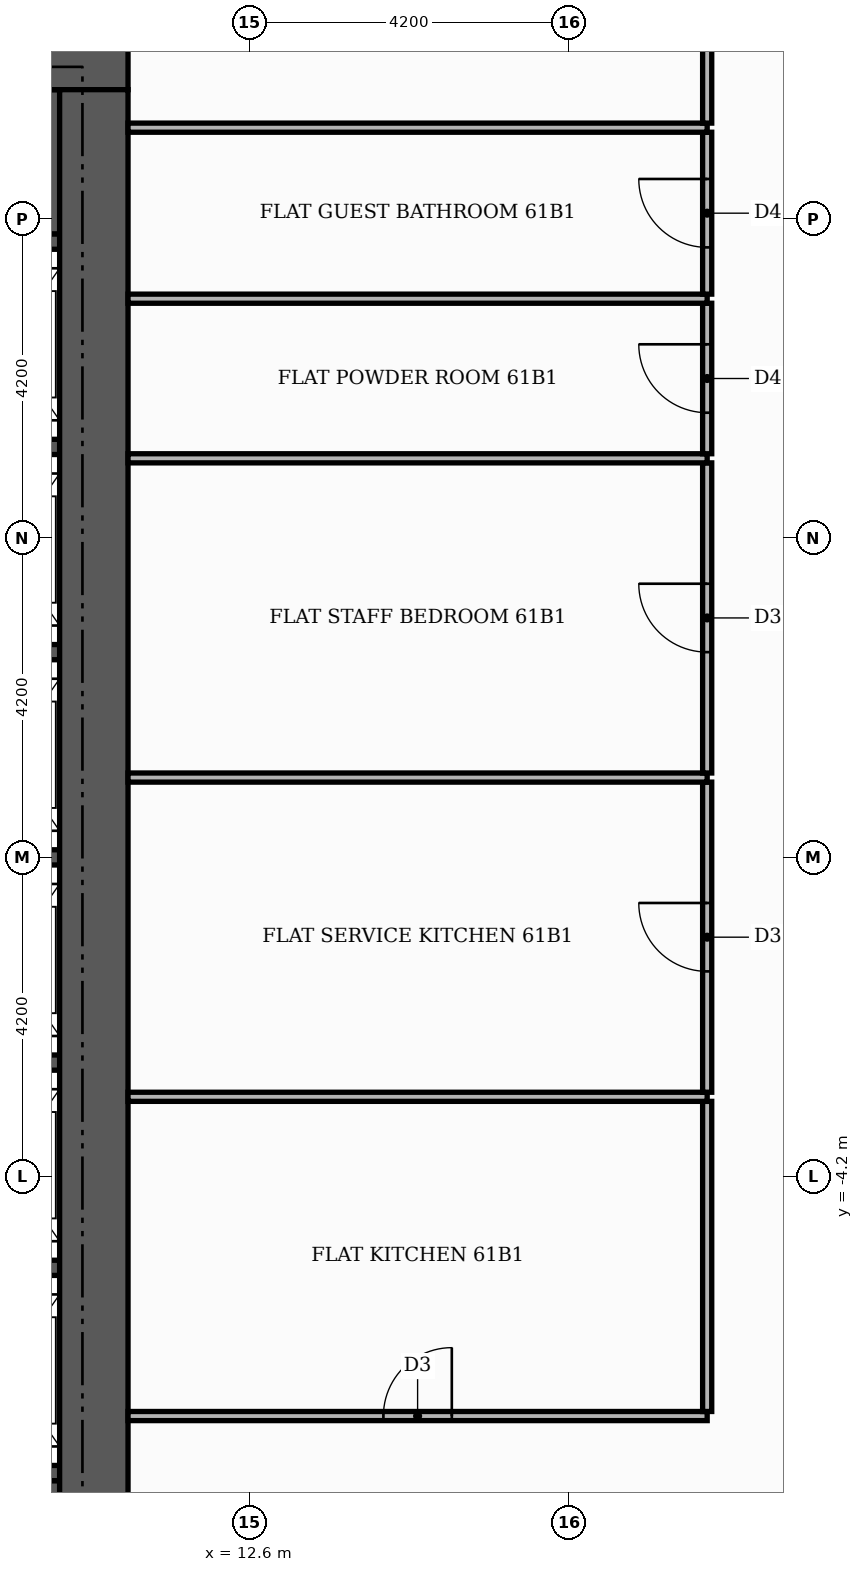
"""IFC4 building model, lengths in metres.
Left out: names, types, materials, properties, quantities, classifications, styles, units other than length and angle.
Written with IfcOpenShell. Run it as: python <this file> out.ifc"""

import sys

from ifc_helpers import new_model, si_unit, direction, frame, frame_2d, origin, place, context, subcontext, project, spatial, rectangle, extrude, element, fill, save


model = new_model("IFC4")
c1 = context("Model", 3, precision=1e-05, world=origin(), true_north=direction((0.0, 1.0)))
c2 = subcontext(c1, "Body", "Model", "MODEL_VIEW")
j1 = project(units=[si_unit("LENGTHUNIT", "METRE"), si_unit("PLANEANGLEUNIT", "RADIAN")], contexts=[c1])
p1 = place(None, origin())
s1 = spatial("IfcSite", under=j1, at=p1, CompositionType="ELEMENT")
p2 = place(p1, origin())
s2 = spatial("IfcBuilding", under=s1, at=p2, CompositionType="ELEMENT")
p3 = place(p2, frame((0.0, 0.0, 256.2)))
s3 = spatial("IfcBuildingStorey", under=s2, at=p3, CompositionType="ELEMENT", Elevation=256.2)
for number, where, z_axis, x_axis in (
    (1, (5.5, -9.15, 0.0), (0.0, 0.0, 1.0), (1.0, 0.0, 0.0)),
    (2, (5.5, 9.15, 0.0), (0.0, 0.0, 1.0), (1.0, 0.0, 0.0)),
):
    element("IfcWall", number, at=place(p3, frame(where, z_axis=z_axis, x_axis=x_axis)), inside=s3, PredefinedType="SHEAR", context=c2, shape_type="SweptSolid", body=[
        extrude(rectangle(XDim=4.6, YDim=1.9, at=frame_2d((2.3, 0.0))), origin(), (0.0, 0.0, 1.0), 3.48),
    ])
for number, where, z_axis, x_axis in (
    (3, (8.1, -8.1, 0.0), (0.0, 0.0, 1.0), (1.0, 0.0, 0.0)),
    (4, (8.1, -5.4, 0.0), (0.0, 0.0, 1.0), (1.0, 0.0, 0.0)),
    (5, (8.1, -2.7, 0.0), (0.0, 0.0, 1.0), (1.0, 0.0, 0.0)),
    (6, (8.1, 0.0, 0.0), (0.0, 0.0, 1.0), (1.0, 0.0, 0.0)),
    (7, (8.1, 2.7, 0.0), (0.0, 0.0, 1.0), (1.0, 0.0, 0.0)),
    (8, (8.1, 5.4, 0.0), (0.0, 0.0, 1.0), (1.0, 0.0, 0.0)),
    (9, (8.1, 8.1, 0.0), (0.0, 0.0, 1.0), (1.0, 0.0, 0.0)),
):
    element("IfcWall", number, at=place(p3, frame(where, z_axis=z_axis, x_axis=x_axis)), inside=s3, PredefinedType="SHEAR", context=c2, shape_type="SweptSolid", body=[
        extrude(rectangle(XDim=2.0, YDim=0.2, at=frame_2d((1.0, 0.0))), origin(), (0.0, 0.0, 1.0), 3.48),
    ])
p4 = place(p3, frame((-11.0, 10.55, 0.0), z_axis=(0.0, 0.0, 1.0), x_axis=(1.0, 0.0, 0.0)))
e10 = element("IfcWall", 10, at=p4, inside=s3, PredefinedType="SHEAR", context=c2, shape_type="SweptSolid", body=[
    extrude(rectangle(XDim=22.0, YDim=0.9, at=frame_2d((11.0, 0.0))), origin(), (0.0, 0.0, 1.0), 3.48),
])
p5 = place(p4, frame((13.3, 0.0, 0.0)))
e11 = element("IfcOpeningElement", 11, at=p5, cuts=e10, PredefinedType="OPENING", context=c2, shape_type="SweptSolid", body=[
    extrude(rectangle(XDim=1.8, YDim=2.2, at=frame_2d((0.9, 1.1))), frame((0.0, 0.46, 0.0), z_axis=(0.0, -1.0, 0.0), x_axis=(1.0, 0.0, 0.0)), (0.0, 0.0, 1.0), 0.92),
])
p6 = place(p3, frame((10.55, -10.1, 0.0), z_axis=(0.0, 0.0, 1.0), x_axis=(0.0, 1.0, 0.0)))
e12 = element("IfcWall", 12, at=p6, inside=s3, PredefinedType="SHEAR", context=c2, shape_type="SweptSolid", body=[
    extrude(rectangle(XDim=20.2, YDim=0.9, at=frame_2d((10.1, 0.0))), origin(), (0.0, 0.0, 1.0), 3.48),
])
p7 = place(p3, frame((11.0, -7.35, 0.0), z_axis=(0.0, 0.0, 1.0), x_axis=(1.0, 0.0, 0.0)))
e13 = element("IfcWall", 13, at=p7, inside=s3, PredefinedType="PARTITIONING", context=c2, shape_type="SweptSolid", body=[
    extrude(rectangle(XDim=7.62, YDim=0.12, at=frame_2d((3.81, 0.0))), origin(), (0.0, 0.0, 1.0), 3.48),
])
p8 = place(p7, frame((3.36, 0.0, 0.0)))
e14 = element("IfcOpeningElement", 14, at=p8, cuts=e13, PredefinedType="OPENING", context=c2, shape_type="SweptSolid", body=[
    extrude(rectangle(XDim=0.9, YDim=2.1, at=frame_2d((0.45, 1.05))), frame((0.0, 0.07, 0.0), z_axis=(0.0, -1.0, 0.0), x_axis=(1.0, 0.0, 0.0)), (0.0, 0.0, 1.0), 0.14),
])
p9 = place(p3, frame((18.62, -7.29, 0.0), z_axis=(0.0, 0.0, 1.0), x_axis=(0.0, 1.0, 0.0)))
e15 = element("IfcWall", 15, at=p9, inside=s3, PredefinedType="PARTITIONING", context=c2, shape_type="SweptSolid", body=[
    extrude(rectangle(XDim=4.08, YDim=0.12, at=frame_2d((2.04, 0.0))), origin(), (0.0, 0.0, 1.0), 3.48),
])
p10 = place(p3, frame((11.0, -3.15, 0.0), z_axis=(0.0, 0.0, 1.0), x_axis=(1.0, 0.0, 0.0)))
e16 = element("IfcWall", 16, at=p10, inside=s3, PredefinedType="PARTITIONING", context=c2, shape_type="SweptSolid", body=[
    extrude(rectangle(XDim=7.62, YDim=0.12, at=frame_2d((3.81, 0.0))), origin(), (0.0, 0.0, 1.0), 3.48),
])
p11 = place(p3, frame((18.62, -3.09, 0.0), z_axis=(0.0, 0.0, 1.0), x_axis=(0.0, 1.0, 0.0)))
e17 = element("IfcWall", 17, at=p11, inside=s3, PredefinedType="PARTITIONING", context=c2, shape_type="SweptSolid", body=[
    extrude(rectangle(XDim=4.08, YDim=0.12, at=frame_2d((2.04, 0.0))), origin(), (0.0, 0.0, 1.0), 3.48),
])
p12 = place(p11, frame((1.59, 0.0, 0.0)))
e18 = element("IfcOpeningElement", 18, at=p12, cuts=e17, PredefinedType="OPENING", context=c2, shape_type="SweptSolid", body=[
    extrude(rectangle(XDim=0.9, YDim=2.1, at=frame_2d((0.45, 1.05))), frame((0.0, 0.07, 0.0), z_axis=(0.0, -1.0, 0.0), x_axis=(1.0, 0.0, 0.0)), (0.0, 0.0, 1.0), 0.14),
])
p13 = place(p3, frame((11.0, 1.05, 0.0), z_axis=(0.0, 0.0, 1.0), x_axis=(1.0, 0.0, 0.0)))
e19 = element("IfcWall", 19, at=p13, inside=s3, PredefinedType="PARTITIONING", context=c2, shape_type="SweptSolid", body=[
    extrude(rectangle(XDim=7.62, YDim=0.12, at=frame_2d((3.81, 0.0))), origin(), (0.0, 0.0, 1.0), 3.48),
])
p14 = place(p3, frame((18.62, 1.11, 0.0), z_axis=(0.0, 0.0, 1.0), x_axis=(0.0, 1.0, 0.0)))
e20 = element("IfcWall", 20, at=p14, inside=s3, PredefinedType="PARTITIONING", context=c2, shape_type="SweptSolid", body=[
    extrude(rectangle(XDim=4.08, YDim=0.12, at=frame_2d((2.04, 0.0))), origin(), (0.0, 0.0, 1.0), 3.48),
])
p15 = place(p14, frame((1.59, 0.0, 0.0)))
e21 = element("IfcOpeningElement", 21, at=p15, cuts=e20, PredefinedType="OPENING", context=c2, shape_type="SweptSolid", body=[
    extrude(rectangle(XDim=0.9, YDim=2.1, at=frame_2d((0.45, 1.05))), frame((0.0, 0.07, 0.0), z_axis=(0.0, -1.0, 0.0), x_axis=(1.0, 0.0, 0.0)), (0.0, 0.0, 1.0), 0.14),
])
p16 = place(p3, frame((11.0, 5.25, 0.0), z_axis=(0.0, 0.0, 1.0), x_axis=(1.0, 0.0, 0.0)))
e22 = element("IfcWall", 22, at=p16, inside=s3, PredefinedType="PARTITIONING", context=c2, shape_type="SweptSolid", body=[
    extrude(rectangle(XDim=7.62, YDim=0.12, at=frame_2d((3.81, 0.0))), origin(), (0.0, 0.0, 1.0), 3.48),
])
p17 = place(p3, frame((18.62, 5.31, 0.0), z_axis=(0.0, 0.0, 1.0), x_axis=(0.0, 1.0, 0.0)))
e23 = element("IfcWall", 23, at=p17, inside=s3, PredefinedType="PARTITIONING", context=c2, shape_type="SweptSolid", body=[
    extrude(rectangle(XDim=1.98, YDim=0.12, at=frame_2d((0.99, 0.0))), origin(), (0.0, 0.0, 1.0), 3.48),
])
p18 = place(p17, frame((0.54, 0.0, 0.0)))
e24 = element("IfcOpeningElement", 24, at=p18, cuts=e23, PredefinedType="OPENING", context=c2, shape_type="SweptSolid", body=[
    extrude(rectangle(XDim=0.9, YDim=2.1, at=frame_2d((0.45, 1.05))), frame((0.0, 0.07, 0.0), z_axis=(0.0, -1.0, 0.0), x_axis=(1.0, 0.0, 0.0)), (0.0, 0.0, 1.0), 0.14),
])
p19 = place(p3, frame((11.0, 7.35, 0.0), z_axis=(0.0, 0.0, 1.0), x_axis=(1.0, 0.0, 0.0)))
e25 = element("IfcWall", 25, at=p19, inside=s3, PredefinedType="PARTITIONING", context=c2, shape_type="SweptSolid", body=[
    extrude(rectangle(XDim=7.62, YDim=0.12, at=frame_2d((3.81, 0.0))), origin(), (0.0, 0.0, 1.0), 3.48),
])
p20 = place(p3, frame((18.62, 7.41, 0.0), z_axis=(0.0, 0.0, 1.0), x_axis=(0.0, 1.0, 0.0)))
e26 = element("IfcWall", 26, at=p20, inside=s3, PredefinedType="PARTITIONING", context=c2, shape_type="SweptSolid", body=[
    extrude(rectangle(XDim=2.13, YDim=0.12, at=frame_2d((1.065, 0.0))), origin(), (0.0, 0.0, 1.0), 3.48),
])
p21 = place(p20, frame((0.615, 0.0, 0.0)))
e27 = element("IfcOpeningElement", 27, at=p21, cuts=e26, PredefinedType="OPENING", context=c2, shape_type="SweptSolid", body=[
    extrude(rectangle(XDim=0.9, YDim=2.1, at=frame_2d((0.45, 1.05))), frame((0.0, 0.07, 0.0), z_axis=(0.0, -1.0, 0.0), x_axis=(1.0, 0.0, 0.0)), (0.0, 0.0, 1.0), 0.14),
])
p22 = place(p3, frame((11.0, 9.6, 0.0), z_axis=(0.0, 0.0, 1.0), x_axis=(1.0, 0.0, 0.0)))
e28 = element("IfcWall", 28, at=p22, inside=s3, PredefinedType="PARTITIONING", context=c2, shape_type="SweptSolid", body=[
    extrude(rectangle(XDim=7.62, YDim=0.12, at=frame_2d((3.81, 0.0))), origin(), (0.0, 0.0, 1.0), 3.48),
])
p23 = place(p3, frame((18.62, 9.66, 0.0), z_axis=(0.0, 0.0, 1.0), x_axis=(0.0, 1.0, 0.0)))
e29 = element("IfcWall", 29, at=p23, inside=s3, PredefinedType="PARTITIONING", context=c2, shape_type="SweptSolid", body=[
    extrude(rectangle(XDim=3.89, YDim=0.12, at=frame_2d((1.945, 0.0))), origin(), (0.0, 0.0, 1.0), 3.48),
])
p24 = place(p23, frame((1.515, 0.0, 0.0)))
e30 = element("IfcOpeningElement", 30, at=p24, cuts=e29, PredefinedType="OPENING", context=c2, shape_type="SweptSolid", body=[
    extrude(rectangle(XDim=0.9, YDim=2.1, at=frame_2d((0.45, 1.05))), frame((0.0, 0.07, 0.0), z_axis=(0.0, -1.0, 0.0), x_axis=(1.0, 0.0, 0.0)), (0.0, 0.0, 1.0), 0.14),
])
p25 = place(p8, origin())
e31 = element("IfcDoor", 31, at=p25, inside=s3, OperationType="SINGLE_SWING_RIGHT", PredefinedType="DOOR", context=c2, shape_type="SweptSolid", body=[
    extrude(rectangle(XDim=0.9, YDim=2.1, at=frame_2d((0.45, 1.05))), frame((0.0, 0.025, 0.0), z_axis=(0.0, -1.0, 0.0), x_axis=(1.0, 0.0, 0.0)), (0.0, 0.0, 1.0), 0.05),
])
fill(e14, e31)
p26 = place(p12, origin())
e32 = element("IfcDoor", 32, at=p26, inside=s3, OperationType="SINGLE_SWING_RIGHT", PredefinedType="DOOR", context=c2, shape_type="SweptSolid", body=[
    extrude(rectangle(XDim=0.9, YDim=2.1, at=frame_2d((0.45, 1.05))), frame((0.0, 0.025, 0.0), z_axis=(0.0, -1.0, 0.0), x_axis=(1.0, 0.0, 0.0)), (0.0, 0.0, 1.0), 0.05),
])
fill(e18, e32)
p27 = place(p15, origin())
e33 = element("IfcDoor", 33, at=p27, inside=s3, OperationType="SINGLE_SWING_RIGHT", PredefinedType="DOOR", context=c2, shape_type="SweptSolid", body=[
    extrude(rectangle(XDim=0.9, YDim=2.1, at=frame_2d((0.45, 1.05))), frame((0.0, 0.025, 0.0), z_axis=(0.0, -1.0, 0.0), x_axis=(1.0, 0.0, 0.0)), (0.0, 0.0, 1.0), 0.05),
])
fill(e21, e33)
p28 = place(p18, origin())
e34 = element("IfcDoor", 34, at=p28, inside=s3, OperationType="SINGLE_SWING_RIGHT", PredefinedType="DOOR", context=c2, shape_type="SweptSolid", body=[
    extrude(rectangle(XDim=0.9, YDim=2.1, at=frame_2d((0.45, 1.05))), frame((0.0, 0.025, 0.0), z_axis=(0.0, -1.0, 0.0), x_axis=(1.0, 0.0, 0.0)), (0.0, 0.0, 1.0), 0.05),
])
fill(e24, e34)
p29 = place(p21, origin())
e35 = element("IfcDoor", 35, at=p29, inside=s3, OperationType="SINGLE_SWING_RIGHT", PredefinedType="DOOR", context=c2, shape_type="SweptSolid", body=[
    extrude(rectangle(XDim=0.9, YDim=2.1, at=frame_2d((0.45, 1.05))), frame((0.0, 0.025, 0.0), z_axis=(0.0, -1.0, 0.0), x_axis=(1.0, 0.0, 0.0)), (0.0, 0.0, 1.0), 0.05),
])
fill(e27, e35)
save(model, sys.argv[1])
